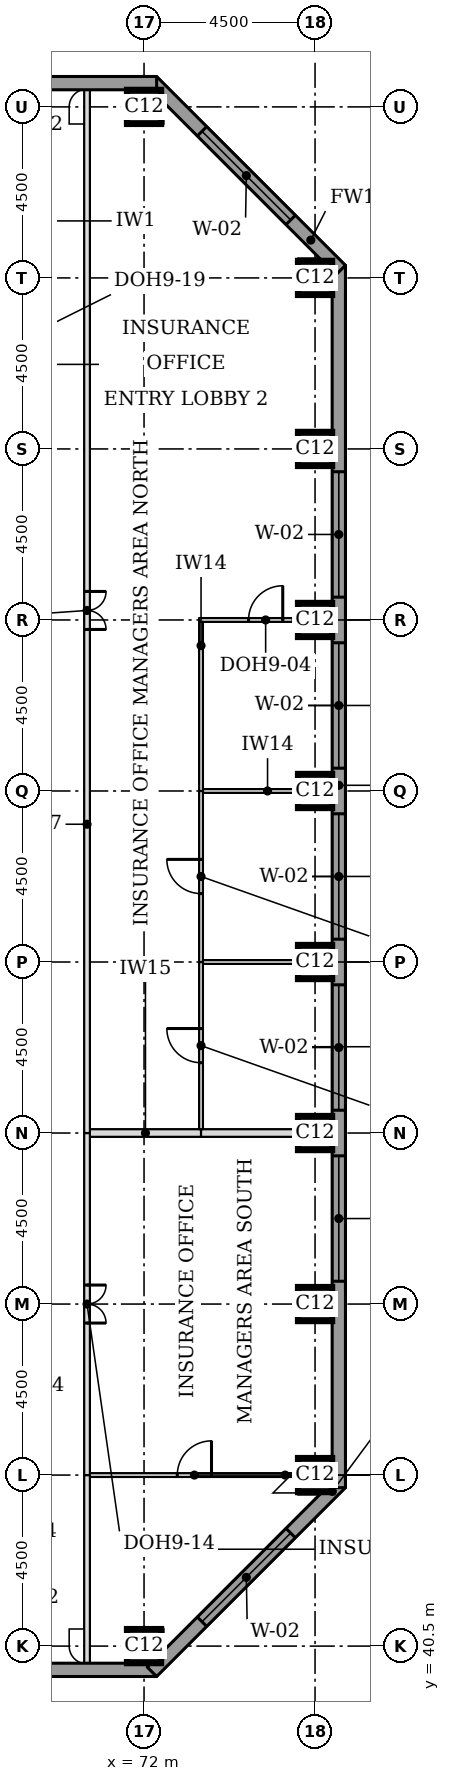
"""IFC4 building model, lengths in metres.
Left out: names, types, materials, properties, quantities, classifications, styles, units other than length and angle.
Written with IfcOpenShell. Run it as: python <this file> out.ifc"""

import sys

from ifc_helpers import new_model, si_unit, direction, frame, frame_2d, origin, origin_2d, place, context, subcontext, project, spatial, rectangle, extrude, element, fill, save


model = new_model("IFC4")
c1 = context("Model", 3, precision=1e-05, world=origin(), true_north=direction((0.0, 1.0)))
c2 = subcontext(c1, "Body", "Model", "MODEL_VIEW")
j1 = project(units=[si_unit("LENGTHUNIT", "METRE"), si_unit("PLANEANGLEUNIT", "RADIAN")], contexts=[c1])
p1 = place(None, origin())
s1 = spatial("IfcSite", under=j1, at=p1, CompositionType="ELEMENT")
p2 = place(p1, origin())
s2 = spatial("IfcBuilding", under=s1, at=p2, CompositionType="ELEMENT")
p3 = place(p2, frame((0.0, 0.0, 211.9)))
s3 = spatial("IfcBuildingStorey", under=s2, at=p3, CompositionType="ELEMENT", Elevation=211.9)
for number, where, z_axis, x_axis in (
    (1, (72.0, 40.5, 0.0), (0.0, 0.0, 1.0), (1.0, 0.0, 0.0)),
    (2, (76.5, 45.0, 0.0), (0.0, 0.0, 1.0), (1.0, 0.0, 0.0)),
    (3, (76.5, 49.5, 0.0), (0.0, 0.0, 1.0), (1.0, 0.0, 0.0)),
    (4, (76.5, 54.0, 0.0), (0.0, 0.0, 1.0), (1.0, 0.0, 0.0)),
    (5, (76.5, 58.5, 0.0), (0.0, 0.0, 1.0), (1.0, 0.0, 0.0)),
    (6, (76.5, 63.0, 0.0), (0.0, 0.0, 1.0), (1.0, 0.0, 0.0)),
    (7, (76.5, 67.5, 0.0), (0.0, 0.0, 1.0), (1.0, 0.0, 0.0)),
    (8, (76.5, 72.0, 0.0), (0.0, 0.0, 1.0), (1.0, 0.0, 0.0)),
    (9, (76.5, 76.5, 0.0), (0.0, 0.0, 1.0), (1.0, 0.0, 0.0)),
    (10, (72.0, 81.0, 0.0), (0.0, 0.0, 1.0), (1.0, 0.0, 0.0)),
):
    element("IfcColumn", number, at=place(p3, frame(where, z_axis=z_axis, x_axis=x_axis)), inside=s3, PredefinedType="COLUMN", context=c2, shape_type="SweptSolid", body=[
        extrude(rectangle(XDim=0.9, YDim=0.9, at=origin_2d()), origin(), (0.0, 0.0, 1.0), 3.7),
    ])
p4 = place(p3, frame((36.0, 39.875, 0.0), z_axis=(0.0, 0.0, 1.0), x_axis=(1.0, 0.0, 0.0)))
e11 = element("IfcWall", 11, at=p4, inside=s3, PredefinedType="STANDARD", context=c2, shape_type="SweptSolid", body=[
    extrude(rectangle(XDim=36.331, YDim=0.35, at=frame_2d((18.166, 0.0))), origin(), (0.0, 0.0, 1.0), 3.525),
])
p5 = place(p4, frame((5.1, 0.0, 0.9)))
e12 = element("IfcOpeningElement", 12, at=p5, cuts=e11, PredefinedType="OPENING", context=c2, shape_type="SweptSolid", body=[
    extrude(rectangle(XDim=3.3, YDim=1.9, at=frame_2d((1.65, 0.95))), frame((0.0, 0.185, 0.0), z_axis=(0.0, -1.0, 0.0), x_axis=(1.0, 0.0, 0.0)), (0.0, 0.0, 1.0), 0.37),
])
p6 = place(p4, frame((9.6, 0.0, 0.9)))
e13 = element("IfcOpeningElement", 13, at=p6, cuts=e11, PredefinedType="OPENING", context=c2, shape_type="SweptSolid", body=[
    extrude(rectangle(XDim=3.3, YDim=1.9, at=frame_2d((1.65, 0.95))), frame((0.0, 0.185, 0.0), z_axis=(0.0, -1.0, 0.0), x_axis=(1.0, 0.0, 0.0)), (0.0, 0.0, 1.0), 0.37),
])
p7 = place(p4, frame((14.1, 0.0, 0.9)))
e14 = element("IfcOpeningElement", 14, at=p7, cuts=e11, PredefinedType="OPENING", context=c2, shape_type="SweptSolid", body=[
    extrude(rectangle(XDim=3.3, YDim=1.9, at=frame_2d((1.65, 0.95))), frame((0.0, 0.185, 0.0), z_axis=(0.0, -1.0, 0.0), x_axis=(1.0, 0.0, 0.0)), (0.0, 0.0, 1.0), 0.37),
])
p8 = place(p4, frame((18.6, 0.0, 0.9)))
e15 = element("IfcOpeningElement", 15, at=p8, cuts=e11, PredefinedType="OPENING", context=c2, shape_type="SweptSolid", body=[
    extrude(rectangle(XDim=3.3, YDim=1.9, at=frame_2d((1.65, 0.95))), frame((0.0, 0.185, 0.0), z_axis=(0.0, -1.0, 0.0), x_axis=(1.0, 0.0, 0.0)), (0.0, 0.0, 1.0), 0.37),
])
p9 = place(p4, frame((23.1, 0.0, 0.9)))
e16 = element("IfcOpeningElement", 16, at=p9, cuts=e11, PredefinedType="OPENING", context=c2, shape_type="SweptSolid", body=[
    extrude(rectangle(XDim=3.3, YDim=1.9, at=frame_2d((1.65, 0.95))), frame((0.0, 0.185, 0.0), z_axis=(0.0, -1.0, 0.0), x_axis=(1.0, 0.0, 0.0)), (0.0, 0.0, 1.0), 0.37),
])
p10 = place(p4, frame((27.6, 0.0, 0.9)))
e17 = element("IfcOpeningElement", 17, at=p10, cuts=e11, PredefinedType="OPENING", context=c2, shape_type="SweptSolid", body=[
    extrude(rectangle(XDim=3.3, YDim=1.9, at=frame_2d((1.65, 0.95))), frame((0.0, 0.185, 0.0), z_axis=(0.0, -1.0, 0.0), x_axis=(1.0, 0.0, 0.0)), (0.0, 0.0, 1.0), 0.37),
])
p11 = place(p3, frame((72.208, 39.824, 0.0), z_axis=(0.0, 0.0, 1.0), x_axis=(0.707106781187, 0.707106781187, 0.0)))
e18 = element("IfcWall", 18, at=p11, inside=s3, PredefinedType="STANDARD", context=c2, shape_type="SweptSolid", body=[
    extrude(rectangle(XDim=7.027, YDim=0.35, at=frame_2d((3.513, 0.0))), origin(), (0.0, 0.0, 1.0), 3.525),
])
p12 = place(p11, frame((1.863, 0.0, 0.9)))
e19 = element("IfcOpeningElement", 19, at=p12, cuts=e18, PredefinedType="OPENING", context=c2, shape_type="SweptSolid", body=[
    extrude(rectangle(XDim=3.3, YDim=1.9, at=frame_2d((1.65, 0.95))), frame((0.0, 0.185, 0.0), z_axis=(0.0, -1.0, 0.0), x_axis=(1.0, 0.0, 0.0)), (0.0, 0.0, 1.0), 0.37),
])
p13 = place(p3, frame((77.125, 44.669, 0.0), z_axis=(0.0, 0.0, 1.0), x_axis=(0.0, 1.0, 0.0)))
e20 = element("IfcWall", 20, at=p13, inside=s3, PredefinedType="STANDARD", context=c2, shape_type="SweptSolid", body=[
    extrude(rectangle(XDim=32.163, YDim=0.35, at=frame_2d((16.081, 0.0))), origin(), (0.0, 0.0, 1.0), 3.525),
])
p14 = place(p13, frame((5.431, 0.0, 0.9)))
e21 = element("IfcOpeningElement", 21, at=p14, cuts=e20, PredefinedType="OPENING", context=c2, shape_type="SweptSolid", body=[
    extrude(rectangle(XDim=3.3, YDim=1.9, at=frame_2d((1.65, 0.95))), frame((0.0, 0.185, 0.0), z_axis=(0.0, -1.0, 0.0), x_axis=(1.0, 0.0, 0.0)), (0.0, 0.0, 1.0), 0.37),
])
p15 = place(p13, frame((9.931, 0.0, 0.9)))
e22 = element("IfcOpeningElement", 22, at=p15, cuts=e20, PredefinedType="OPENING", context=c2, shape_type="SweptSolid", body=[
    extrude(rectangle(XDim=3.3, YDim=1.9, at=frame_2d((1.65, 0.95))), frame((0.0, 0.185, 0.0), z_axis=(0.0, -1.0, 0.0), x_axis=(1.0, 0.0, 0.0)), (0.0, 0.0, 1.0), 0.37),
])
p16 = place(p13, frame((14.431, 0.0, 0.9)))
e23 = element("IfcOpeningElement", 23, at=p16, cuts=e20, PredefinedType="OPENING", context=c2, shape_type="SweptSolid", body=[
    extrude(rectangle(XDim=3.3, YDim=1.9, at=frame_2d((1.65, 0.95))), frame((0.0, 0.185, 0.0), z_axis=(0.0, -1.0, 0.0), x_axis=(1.0, 0.0, 0.0)), (0.0, 0.0, 1.0), 0.37),
])
p17 = place(p13, frame((18.931, 0.0, 0.9)))
e24 = element("IfcOpeningElement", 24, at=p17, cuts=e20, PredefinedType="OPENING", context=c2, shape_type="SweptSolid", body=[
    extrude(rectangle(XDim=3.3, YDim=1.9, at=frame_2d((1.65, 0.95))), frame((0.0, 0.185, 0.0), z_axis=(0.0, -1.0, 0.0), x_axis=(1.0, 0.0, 0.0)), (0.0, 0.0, 1.0), 0.37),
])
p18 = place(p13, frame((23.431, 0.0, 0.9)))
e25 = element("IfcOpeningElement", 25, at=p18, cuts=e20, PredefinedType="OPENING", context=c2, shape_type="SweptSolid", body=[
    extrude(rectangle(XDim=3.3, YDim=1.9, at=frame_2d((1.65, 0.95))), frame((0.0, 0.185, 0.0), z_axis=(0.0, -1.0, 0.0), x_axis=(1.0, 0.0, 0.0)), (0.0, 0.0, 1.0), 0.37),
])
p19 = place(p3, frame((77.176, 76.708, 0.0), z_axis=(0.0, 0.0, 1.0), x_axis=(-0.707106781187, 0.707106781187, 0.0)))
e26 = element("IfcWall", 26, at=p19, inside=s3, PredefinedType="STANDARD", context=c2, shape_type="SweptSolid", body=[
    extrude(rectangle(XDim=7.027, YDim=0.35, at=frame_2d((3.513, 0.0))), origin(), (0.0, 0.0, 1.0), 3.525),
])
p20 = place(p19, frame((1.863, 0.0, 0.9)))
e27 = element("IfcOpeningElement", 27, at=p20, cuts=e26, PredefinedType="OPENING", context=c2, shape_type="SweptSolid", body=[
    extrude(rectangle(XDim=3.3, YDim=1.9, at=frame_2d((1.65, 0.95))), frame((0.0, 0.185, 0.0), z_axis=(0.0, -1.0, 0.0), x_axis=(1.0, 0.0, 0.0)), (0.0, 0.0, 1.0), 0.37),
])
p21 = place(p3, frame((72.331, 81.625, 0.0), z_axis=(0.0, 0.0, 1.0), x_axis=(-1.0, 0.0, 0.0)))
e28 = element("IfcWall", 28, at=p21, inside=s3, PredefinedType="STANDARD", context=c2, shape_type="SweptSolid", body=[
    extrude(rectangle(XDim=32.163, YDim=0.35, at=frame_2d((16.081, 0.0))), origin(), (0.0, 0.0, 1.0), 3.525),
])
p22 = place(p21, frame((5.431, 0.0, 0.9)))
e29 = element("IfcOpeningElement", 29, at=p22, cuts=e28, PredefinedType="OPENING", context=c2, shape_type="SweptSolid", body=[
    extrude(rectangle(XDim=3.3, YDim=1.9, at=frame_2d((1.65, 0.95))), frame((0.0, 0.185, 0.0), z_axis=(0.0, -1.0, 0.0), x_axis=(1.0, 0.0, 0.0)), (0.0, 0.0, 1.0), 0.37),
])
p23 = place(p21, frame((9.931, 0.0, 0.9)))
e30 = element("IfcOpeningElement", 30, at=p23, cuts=e28, PredefinedType="OPENING", context=c2, shape_type="SweptSolid", body=[
    extrude(rectangle(XDim=3.3, YDim=1.9, at=frame_2d((1.65, 0.95))), frame((0.0, 0.185, 0.0), z_axis=(0.0, -1.0, 0.0), x_axis=(1.0, 0.0, 0.0)), (0.0, 0.0, 1.0), 0.37),
])
p24 = place(p21, frame((14.431, 0.0, 0.9)))
e31 = element("IfcOpeningElement", 31, at=p24, cuts=e28, PredefinedType="OPENING", context=c2, shape_type="SweptSolid", body=[
    extrude(rectangle(XDim=3.3, YDim=1.9, at=frame_2d((1.65, 0.95))), frame((0.0, 0.185, 0.0), z_axis=(0.0, -1.0, 0.0), x_axis=(1.0, 0.0, 0.0)), (0.0, 0.0, 1.0), 0.37),
])
p25 = place(p21, frame((18.931, 0.0, 0.9)))
e32 = element("IfcOpeningElement", 32, at=p25, cuts=e28, PredefinedType="OPENING", context=c2, shape_type="SweptSolid", body=[
    extrude(rectangle(XDim=3.3, YDim=1.9, at=frame_2d((1.65, 0.95))), frame((0.0, 0.185, 0.0), z_axis=(0.0, -1.0, 0.0), x_axis=(1.0, 0.0, 0.0)), (0.0, 0.0, 1.0), 0.37),
])
p26 = place(p21, frame((23.431, 0.0, 0.9)))
e33 = element("IfcOpeningElement", 33, at=p26, cuts=e28, PredefinedType="OPENING", context=c2, shape_type="SweptSolid", body=[
    extrude(rectangle(XDim=3.3, YDim=1.9, at=frame_2d((1.65, 0.95))), frame((0.0, 0.185, 0.0), z_axis=(0.0, -1.0, 0.0), x_axis=(1.0, 0.0, 0.0)), (0.0, 0.0, 1.0), 0.37),
])
p27 = place(p3, frame((70.575, 45.0, 0.0), z_axis=(0.0, 0.0, 1.0), x_axis=(1.0, 0.0, 0.0)))
e34 = element("IfcWall", 34, at=p27, inside=s3, PredefinedType="PARTITIONING", context=c2, shape_type="SweptSolid", body=[
    extrude(rectangle(XDim=5.475, YDim=0.1, at=frame_2d((2.738, 0.0))), origin(), (0.0, 0.0, 1.0), 3.096),
])
p28 = place(p27, frame((2.3, 0.0, 0.0)))
e35 = element("IfcOpeningElement", 35, at=p28, cuts=e34, PredefinedType="OPENING", context=c2, shape_type="SweptSolid", body=[
    extrude(rectangle(XDim=0.9, YDim=2.1, at=frame_2d((0.45, 1.05))), frame((0.0, 0.06, 0.0), z_axis=(0.0, -1.0, 0.0), x_axis=(1.0, 0.0, 0.0)), (0.0, 0.0, 1.0), 0.12),
])
p29 = place(p3, frame((70.575, 54.0, 0.0), z_axis=(0.0, 0.0, 1.0), x_axis=(1.0, 0.0, 0.0)))
e36 = element("IfcWall", 36, at=p29, inside=s3, PredefinedType="PARTITIONING", context=c2, shape_type="SweptSolid", body=[
    extrude(rectangle(XDim=2.925, YDim=0.2, at=frame_2d((1.462, 0.0))), origin(), (0.0, 0.0, 1.0), 3.55),
])
p30 = place(p3, frame((73.5, 54.0, 0.0), z_axis=(0.0, 0.0, 1.0), x_axis=(1.0, 0.0, 0.0)))
e37 = element("IfcWall", 37, at=p30, inside=s3, PredefinedType="PARTITIONING", context=c2, shape_type="SweptSolid", body=[
    extrude(rectangle(XDim=3.45, YDim=0.2, at=frame_2d((1.725, 0.0))), origin(), (0.0, 0.0, 1.0), 3.55),
])
for number, where, z_axis, x_axis in (
    (38, (73.55, 58.5, 0.0), (0.0, 0.0, 1.0), (1.0, 0.0, 0.0)),
    (39, (73.55, 63.0, 0.0), (0.0, 0.0, 1.0), (1.0, 0.0, 0.0)),
):
    element("IfcWall", number, at=place(p3, frame(where, z_axis=z_axis, x_axis=x_axis)), inside=s3, PredefinedType="PARTITIONING", context=c2, shape_type="SweptSolid", body=[
        extrude(rectangle(XDim=3.4, YDim=0.1, at=frame_2d((1.7, 0.0))), origin(), (0.0, 0.0, 1.0), 3.55),
    ])
p31 = place(p3, frame((73.45, 67.5, 0.0), z_axis=(0.0, 0.0, 1.0), x_axis=(1.0, 0.0, 0.0)))
e40 = element("IfcWall", 40, at=p31, inside=s3, PredefinedType="PARTITIONING", context=c2, shape_type="SweptSolid", body=[
    extrude(rectangle(XDim=3.5, YDim=0.1, at=frame_2d((1.75, 0.0))), origin(), (0.0, 0.0, 1.0), 3.55),
])
p32 = place(p31, frame((1.3, 0.0, 0.0)))
e41 = element("IfcOpeningElement", 41, at=p32, cuts=e40, PredefinedType="OPENING", context=c2, shape_type="SweptSolid", body=[
    extrude(rectangle(XDim=0.9, YDim=2.1, at=frame_2d((0.45, 1.05))), frame((0.0, 0.06, 0.0), z_axis=(0.0, -1.0, 0.0), x_axis=(1.0, 0.0, 0.0)), (0.0, 0.0, 1.0), 0.12),
])
p33 = place(p3, frame((70.5, 40.05, 0.0), z_axis=(0.0, 0.0, 1.0), x_axis=(0.0, 1.0, 0.0)))
e42 = element("IfcWall", 42, at=p33, inside=s3, PredefinedType="PARTITIONING", context=c2, shape_type="SweptSolid", body=[
    extrude(rectangle(XDim=4.95, YDim=0.15, at=frame_2d((2.475, 0.0))), origin(), (0.0, 0.0, 1.0), 3.55),
])
p34 = place(p3, frame((70.5, 45.0, 0.0), z_axis=(0.0, 0.0, 1.0), x_axis=(0.0, 1.0, 0.0)))
e43 = element("IfcWall", 43, at=p34, inside=s3, PredefinedType="PARTITIONING", context=c2, shape_type="SweptSolid", body=[
    extrude(rectangle(XDim=9.0, YDim=0.15, at=frame_2d((4.5, 0.0))), origin(), (0.0, 0.0, 1.0), 3.55),
])
p35 = place(p34, frame((4.0, 0.0, 0.0)))
e44 = element("IfcOpeningElement", 44, at=p35, cuts=e43, PredefinedType="OPENING", context=c2, shape_type="SweptSolid", body=[
    extrude(rectangle(XDim=1.0, YDim=2.1, at=frame_2d((0.5, 1.05))), frame((0.0, 0.085, 0.0), z_axis=(0.0, -1.0, 0.0), x_axis=(1.0, 0.0, 0.0)), (0.0, 0.0, 1.0), 0.17),
])
p36 = place(p3, frame((70.5, 54.0, 0.0), z_axis=(0.0, 0.0, 1.0), x_axis=(0.0, 1.0, 0.0)))
e45 = element("IfcWall", 45, at=p36, inside=s3, PredefinedType="PARTITIONING", context=c2, shape_type="SweptSolid", body=[
    extrude(rectangle(XDim=27.45, YDim=0.15, at=frame_2d((13.725, 0.0))), origin(), (0.0, 0.0, 1.0), 3.55),
])
p37 = place(p36, frame((13.25, 0.0, 0.0)))
e46 = element("IfcOpeningElement", 46, at=p37, cuts=e45, PredefinedType="OPENING", context=c2, shape_type="SweptSolid", body=[
    extrude(rectangle(XDim=1.0, YDim=2.1, at=frame_2d((0.5, 1.05))), frame((0.0, 0.085, 0.0), z_axis=(0.0, -1.0, 0.0), x_axis=(1.0, 0.0, 0.0)), (0.0, 0.0, 1.0), 0.17),
])
p38 = place(p3, frame((73.5, 54.1, 0.0), z_axis=(0.0, 0.0, 1.0), x_axis=(0.0, 1.0, 0.0)))
e47 = element("IfcWall", 47, at=p38, inside=s3, PredefinedType="PARTITIONING", context=c2, shape_type="SweptSolid", body=[
    extrude(rectangle(XDim=4.4, YDim=0.1, at=frame_2d((2.2, 0.0))), origin(), (0.0, 0.0, 1.0), 3.55),
])
p39 = place(p38, frame((1.75, 0.0, 0.0)))
e48 = element("IfcOpeningElement", 48, at=p39, cuts=e47, PredefinedType="OPENING", context=c2, shape_type="SweptSolid", body=[
    extrude(rectangle(XDim=0.9, YDim=2.1, at=frame_2d((0.45, 1.05))), frame((0.0, 0.06, 0.0), z_axis=(0.0, -1.0, 0.0), x_axis=(1.0, 0.0, 0.0)), (0.0, 0.0, 1.0), 0.12),
])
p40 = place(p3, frame((73.5, 58.5, 0.0), z_axis=(0.0, 0.0, 1.0), x_axis=(0.0, 1.0, 0.0)))
e49 = element("IfcWall", 49, at=p40, inside=s3, PredefinedType="PARTITIONING", context=c2, shape_type="SweptSolid", body=[
    extrude(rectangle(XDim=4.5, YDim=0.1, at=frame_2d((2.25, 0.0))), origin(), (0.0, 0.0, 1.0), 3.55),
])
p41 = place(p40, frame((1.8, 0.0, 0.0)))
e50 = element("IfcOpeningElement", 50, at=p41, cuts=e49, PredefinedType="OPENING", context=c2, shape_type="SweptSolid", body=[
    extrude(rectangle(XDim=0.9, YDim=2.1, at=frame_2d((0.45, 1.05))), frame((0.0, 0.06, 0.0), z_axis=(0.0, -1.0, 0.0), x_axis=(1.0, 0.0, 0.0)), (0.0, 0.0, 1.0), 0.12),
])
p42 = place(p3, frame((73.5, 63.0, 0.0), z_axis=(0.0, 0.0, 1.0), x_axis=(0.0, 1.0, 0.0)))
e51 = element("IfcWall", 51, at=p42, inside=s3, PredefinedType="PARTITIONING", context=c2, shape_type="SweptSolid", body=[
    extrude(rectangle(XDim=4.45, YDim=0.1, at=frame_2d((2.225, 0.0))), origin(), (0.0, 0.0, 1.0), 3.55),
])
p43 = place(p12, origin())
e52 = element("IfcWindow", 52, at=p43, inside=s3, PartitioningType="SINGLE_PANEL", PredefinedType="WINDOW", context=c2, shape_type="SweptSolid", body=[
    extrude(rectangle(XDim=3.3, YDim=1.9, at=frame_2d((1.65, 0.95))), frame((0.0, 0.085, 0.0), z_axis=(0.0, -1.0, 0.0), x_axis=(1.0, 0.0, 0.0)), (0.0, 0.0, 1.0), 0.06),
])
fill(e19, e52)
p44 = place(p14, origin())
e53 = element("IfcWindow", 53, at=p44, inside=s3, PartitioningType="SINGLE_PANEL", PredefinedType="WINDOW", context=c2, shape_type="SweptSolid", body=[
    extrude(rectangle(XDim=3.3, YDim=1.9, at=frame_2d((1.65, 0.95))), frame((0.0, 0.085, 0.0), z_axis=(0.0, -1.0, 0.0), x_axis=(1.0, 0.0, 0.0)), (0.0, 0.0, 1.0), 0.06),
])
fill(e21, e53)
p45 = place(p15, origin())
e54 = element("IfcWindow", 54, at=p45, inside=s3, PartitioningType="SINGLE_PANEL", PredefinedType="WINDOW", context=c2, shape_type="SweptSolid", body=[
    extrude(rectangle(XDim=3.3, YDim=1.9, at=frame_2d((1.65, 0.95))), frame((0.0, 0.085, 0.0), z_axis=(0.0, -1.0, 0.0), x_axis=(1.0, 0.0, 0.0)), (0.0, 0.0, 1.0), 0.06),
])
fill(e22, e54)
p46 = place(p16, origin())
e55 = element("IfcWindow", 55, at=p46, inside=s3, PartitioningType="SINGLE_PANEL", PredefinedType="WINDOW", context=c2, shape_type="SweptSolid", body=[
    extrude(rectangle(XDim=3.3, YDim=1.9, at=frame_2d((1.65, 0.95))), frame((0.0, 0.085, 0.0), z_axis=(0.0, -1.0, 0.0), x_axis=(1.0, 0.0, 0.0)), (0.0, 0.0, 1.0), 0.06),
])
fill(e23, e55)
p47 = place(p17, origin())
e56 = element("IfcWindow", 56, at=p47, inside=s3, PartitioningType="SINGLE_PANEL", PredefinedType="WINDOW", context=c2, shape_type="SweptSolid", body=[
    extrude(rectangle(XDim=3.3, YDim=1.9, at=frame_2d((1.65, 0.95))), frame((0.0, 0.085, 0.0), z_axis=(0.0, -1.0, 0.0), x_axis=(1.0, 0.0, 0.0)), (0.0, 0.0, 1.0), 0.06),
])
fill(e24, e56)
p48 = place(p18, origin())
e57 = element("IfcWindow", 57, at=p48, inside=s3, PartitioningType="SINGLE_PANEL", PredefinedType="WINDOW", context=c2, shape_type="SweptSolid", body=[
    extrude(rectangle(XDim=3.3, YDim=1.9, at=frame_2d((1.65, 0.95))), frame((0.0, 0.085, 0.0), z_axis=(0.0, -1.0, 0.0), x_axis=(1.0, 0.0, 0.0)), (0.0, 0.0, 1.0), 0.06),
])
fill(e25, e57)
p49 = place(p20, origin())
e58 = element("IfcWindow", 58, at=p49, inside=s3, PartitioningType="SINGLE_PANEL", PredefinedType="WINDOW", context=c2, shape_type="SweptSolid", body=[
    extrude(rectangle(XDim=3.3, YDim=1.9, at=frame_2d((1.65, 0.95))), frame((0.0, 0.085, 0.0), z_axis=(0.0, -1.0, 0.0), x_axis=(1.0, 0.0, 0.0)), (0.0, 0.0, 1.0), 0.06),
])
fill(e27, e58)
p50 = place(p35, frame((1.0, 0.0, 0.0), z_axis=(0.0, 0.0, 1.0), x_axis=(-1.0, 0.0, 0.0)))
e59 = element("IfcDoor", 59, at=p50, inside=s3, OperationType="DOUBLE_DOOR_SINGLE_SWING", PredefinedType="DOOR", context=c2, shape_type="SweptSolid", body=[
    extrude(rectangle(XDim=1.0, YDim=2.1, at=frame_2d((0.5, 1.05))), frame((0.0, 0.025, 0.0), z_axis=(0.0, -1.0, 0.0), x_axis=(1.0, 0.0, 0.0)), (0.0, 0.0, 1.0), 0.05),
])
fill(e44, e59)
p51 = place(p28, origin())
e60 = element("IfcDoor", 60, at=p51, inside=s3, OperationType="SINGLE_SWING_RIGHT", PredefinedType="DOOR", context=c2, shape_type="SweptSolid", body=[
    extrude(rectangle(XDim=0.9, YDim=2.1, at=frame_2d((0.45, 1.05))), frame((0.0, 0.025, 0.0), z_axis=(0.0, -1.0, 0.0), x_axis=(1.0, 0.0, 0.0)), (0.0, 0.0, 1.0), 0.05),
])
fill(e35, e60)
p52 = place(p37, frame((1.0, 0.0, 0.0), z_axis=(0.0, 0.0, 1.0), x_axis=(-1.0, 0.0, 0.0)))
e61 = element("IfcDoor", 61, at=p52, inside=s3, OperationType="DOUBLE_DOOR_SINGLE_SWING", PredefinedType="DOOR", context=c2, shape_type="SweptSolid", body=[
    extrude(rectangle(XDim=1.0, YDim=2.1, at=frame_2d((0.5, 1.05))), frame((0.0, 0.025, 0.0), z_axis=(0.0, -1.0, 0.0), x_axis=(1.0, 0.0, 0.0)), (0.0, 0.0, 1.0), 0.05),
])
fill(e46, e61)
p53 = place(p39, origin())
e62 = element("IfcDoor", 62, at=p53, inside=s3, OperationType="SINGLE_SWING_RIGHT", PredefinedType="DOOR", context=c2, shape_type="SweptSolid", body=[
    extrude(rectangle(XDim=0.9, YDim=2.1, at=frame_2d((0.45, 1.05))), frame((0.0, 0.025, 0.0), z_axis=(0.0, -1.0, 0.0), x_axis=(1.0, 0.0, 0.0)), (0.0, 0.0, 1.0), 0.05),
])
fill(e48, e62)
p54 = place(p41, origin())
e63 = element("IfcDoor", 63, at=p54, inside=s3, OperationType="SINGLE_SWING_RIGHT", PredefinedType="DOOR", context=c2, shape_type="SweptSolid", body=[
    extrude(rectangle(XDim=0.9, YDim=2.1, at=frame_2d((0.45, 1.05))), frame((0.0, 0.025, 0.0), z_axis=(0.0, -1.0, 0.0), x_axis=(1.0, 0.0, 0.0)), (0.0, 0.0, 1.0), 0.05),
])
fill(e50, e63)
p55 = place(p32, origin())
e64 = element("IfcDoor", 64, at=p55, inside=s3, OperationType="SINGLE_SWING_RIGHT", PredefinedType="DOOR", context=c2, shape_type="SweptSolid", body=[
    extrude(rectangle(XDim=0.9, YDim=2.1, at=frame_2d((0.45, 1.05))), frame((0.0, 0.025, 0.0), z_axis=(0.0, -1.0, 0.0), x_axis=(1.0, 0.0, 0.0)), (0.0, 0.0, 1.0), 0.05),
])
fill(e41, e64)
save(model, sys.argv[1])
